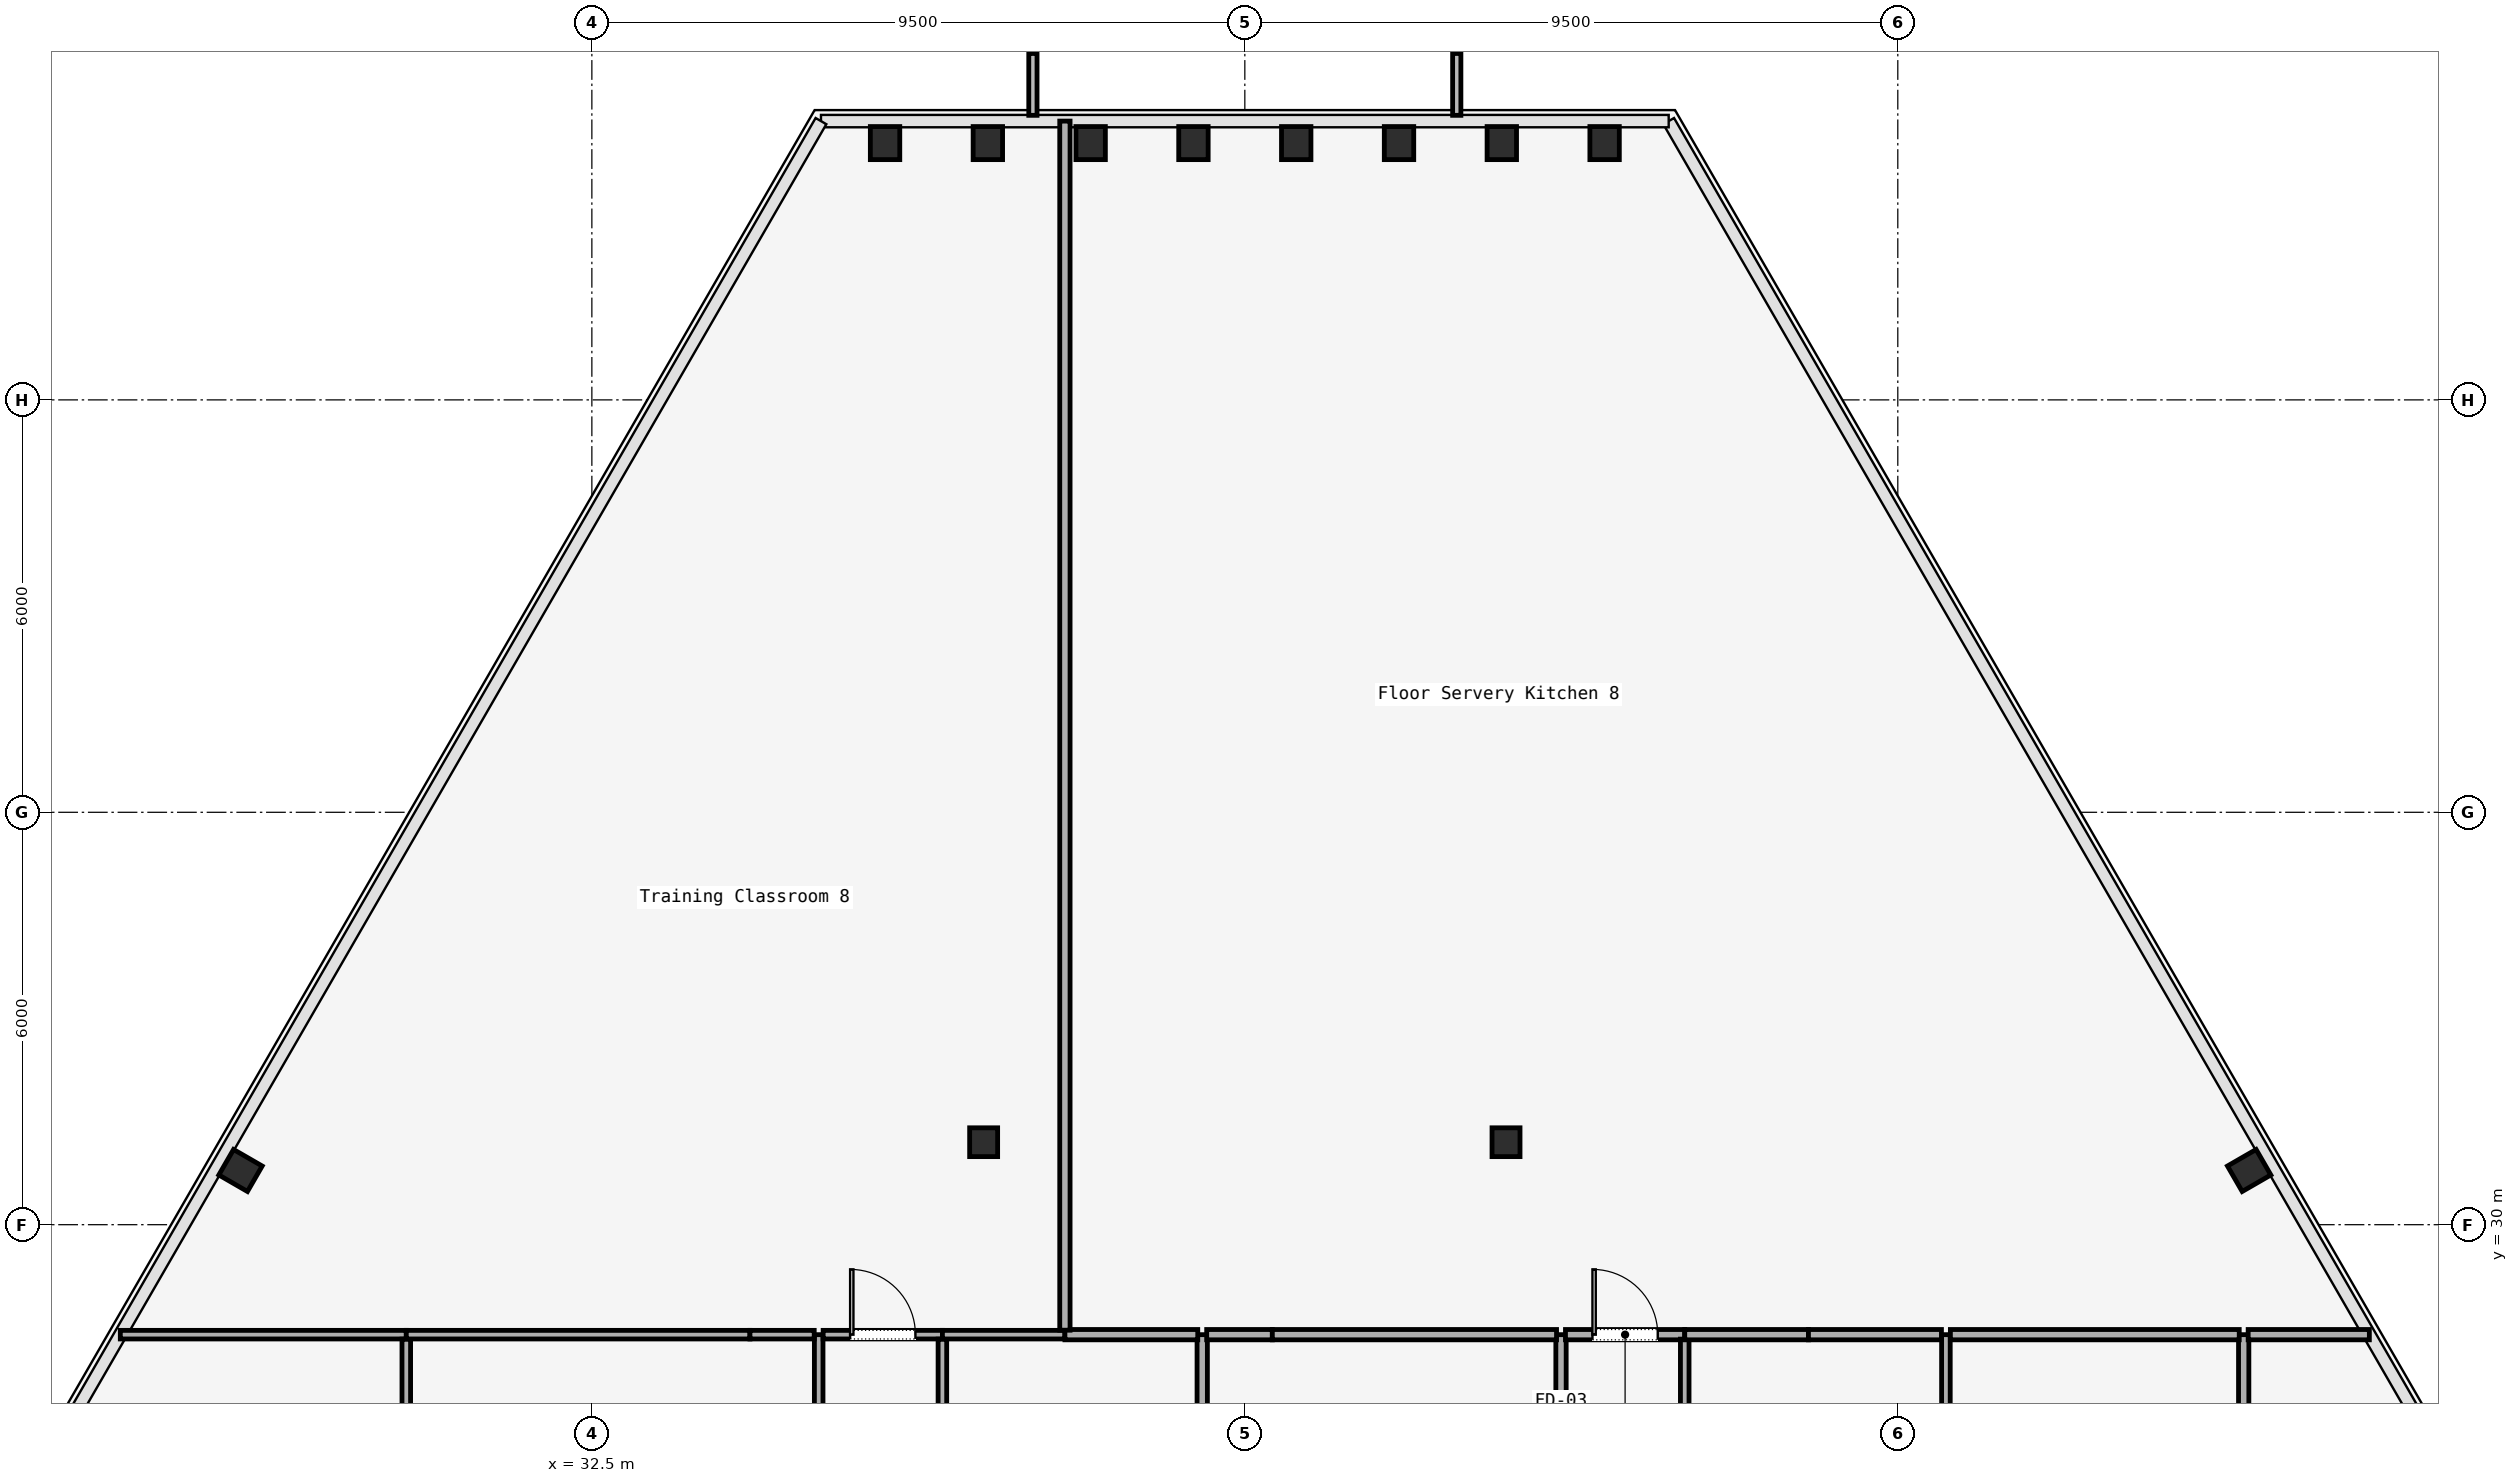
"""IFC4 building model, lengths in metres.
Left out: names, types, materials, properties, quantities, classifications, styles, units other than length and angle.
Written with IfcOpenShell. Run it as: python <this file> out.ifc"""

import sys

from ifc_helpers import new_model, si_unit, direction, frame, frame_2d, origin, origin_2d, place, context, subcontext, project, spatial, rectangle, i_section, extrude, element, fill, save


model = new_model("IFC4")
c1 = context("Model", 3, precision=1e-05, world=origin(), true_north=direction((0.0, 1.0)))
c2 = subcontext(c1, "Body", "Model", "MODEL_VIEW")
j1 = project(units=[si_unit("LENGTHUNIT", "METRE"), si_unit("PLANEANGLEUNIT", "RADIAN")], contexts=[c1])
p1 = place(None, origin())
s1 = spatial("IfcSite", under=j1, at=p1, CompositionType="ELEMENT")
p2 = place(p1, origin())
s2 = spatial("IfcBuilding", under=s1, at=p2, CompositionType="ELEMENT")
p3 = place(p2, frame((0.0, 0.0, 130.8)))
s3 = spatial("IfcBuildingStorey", under=s2, at=p3, CompositionType="ELEMENT", Elevation=130.8)
for number, where, z_axis, x_axis in (
    (1, (38.2, 31.2, 0.0), (0.0, 0.0, 1.0), (1.0, 0.0, 0.0)),
    (2, (45.8, 31.2, 0.0), (0.0, 0.0, 1.0), (1.0, 0.0, 0.0)),
):
    element("IfcColumn", number, at=place(p3, frame(where, z_axis=z_axis, x_axis=x_axis)), inside=s3, PredefinedType="COLUMN", context=c2, shape_type="SweptSolid", body=[
        extrude(i_section(OverallWidth=0.407, OverallDepth=0.419, WebThickness=0.031, FlangeThickness=0.049, FilletRadius=0.015, at=origin_2d()), origin(), (0.0, 0.0, 1.0), 3.58),
    ])
for number, where, z_axis, x_axis in (
    (3, (56.612, 30.789, 0.0), (0.0, 0.0, 1.0), (-0.5, 0.866, 0.0)),
    (4, (47.234, 45.736, 0.0), (0.0, 0.0, 1.0), (1.0, 0.0, 0.0)),
    (5, (45.739, 45.736, 0.0), (0.0, 0.0, 1.0), (1.0, 0.0, 0.0)),
    (6, (44.243, 45.736, 0.0), (0.0, 0.0, 1.0), (1.0, 0.0, 0.0)),
    (7, (42.748, 45.736, 0.0), (0.0, 0.0, 1.0), (1.0, 0.0, 0.0)),
    (8, (41.252, 45.736, 0.0), (0.0, 0.0, 1.0), (1.0, 0.0, 0.0)),
    (9, (39.757, 45.736, 0.0), (0.0, 0.0, 1.0), (1.0, 0.0, 0.0)),
    (10, (38.261, 45.736, 0.0), (0.0, 0.0, 1.0), (1.0, 0.0, 0.0)),
    (11, (36.766, 45.736, 0.0), (0.0, 0.0, 1.0), (1.0, 0.0, 0.0)),
    (12, (27.388, 30.789, 0.0), (0.0, 0.0, 1.0), (0.5, 0.866, 0.0)),
):
    element("IfcColumn", number, at=place(p3, frame(where, z_axis=z_axis, x_axis=x_axis)), inside=s3, PredefinedType="COLUMN", context=c2, shape_type="SweptSolid", body=[
        extrude(i_section(OverallWidth=0.428, OverallDepth=0.481, WebThickness=0.051, FlangeThickness=0.065, FilletRadius=0.015, at=origin_2d()), origin(), (0.0, 0.0, 1.0), 3.58),
    ])
p4 = place(p3, frame((35.8, 24.575, 0.0), z_axis=(0.0, 0.0, 1.0), x_axis=(0.0, 1.0, 0.0)))
e13 = element("IfcWall", 13, at=p4, inside=s3, PredefinedType="PARTITIONING", context=c2, shape_type="SweptSolid", body=[
    extrude(rectangle(XDim=3.825, YDim=0.125, at=frame_2d((1.912, 0.0))), origin(), (0.0, 0.0, 1.0), 3.01),
])
p5 = place(p4, frame((1.437, 0.0, 0.0)))
e14 = element("IfcOpeningElement", 14, at=p5, cuts=e13, PredefinedType="OPENING", context=c2, shape_type="SweptSolid", body=[
    extrude(rectangle(XDim=0.95, YDim=2.2, at=frame_2d((0.475, 1.1))), frame((0.0, 0.062, 0.0), z_axis=(0.0, -1.0, 0.0), x_axis=(1.0, 0.0, 0.0)), (0.0, 0.0, 1.0), 0.125),
])
p6 = place(p3, frame((35.865, 28.4, 0.0), z_axis=(0.0, 0.0, 1.0), x_axis=(1.0, 0.0, 0.0)))
e15 = element("IfcWall", 15, at=p6, inside=s3, PredefinedType="PARTITIONING", context=c2, shape_type="SweptSolid", body=[
    extrude(rectangle(XDim=1.735, YDim=0.125, at=frame_2d((0.868, 0.0))), origin(), (0.0, 0.0, 1.0), 3.01),
])
p7 = place(p6, frame((0.393, 0.0, 0.0)))
e16 = element("IfcOpeningElement", 16, at=p7, cuts=e15, PredefinedType="OPENING", context=c2, shape_type="SweptSolid", body=[
    extrude(rectangle(XDim=0.95, YDim=2.2, at=frame_2d((0.475, 1.1))), frame((0.0, 0.062, 0.0), z_axis=(0.0, -1.0, 0.0), x_axis=(1.0, 0.0, 0.0)), (0.0, 0.0, 1.0), 0.125),
])
p8 = place(p3, frame((37.6, 28.335, 0.0), z_axis=(0.0, 0.0, 1.0), x_axis=(0.0, -1.0, 0.0)))
e17 = element("IfcWall", 17, at=p8, inside=s3, PredefinedType="PARTITIONING", context=c2, shape_type="SweptSolid", body=[
    extrude(rectangle(XDim=3.77, YDim=0.125, at=frame_2d((1.885, 0.0))), origin(), (0.0, 0.0, 1.0), 3.01),
])
p9 = place(p8, frame((1.41, 0.0, 0.0)))
e18 = element("IfcOpeningElement", 18, at=p9, cuts=e17, PredefinedType="OPENING", context=c2, shape_type="SweptSolid", body=[
    extrude(rectangle(XDim=0.95, YDim=2.2, at=frame_2d((0.475, 1.1))), frame((0.0, 0.062, 0.0), z_axis=(0.0, -1.0, 0.0), x_axis=(1.0, 0.0, 0.0)), (0.0, 0.0, 1.0), 0.125),
])
p10 = place(p3, frame((46.6, 24.367, 0.0), z_axis=(0.0, 0.0, 1.0), x_axis=(0.0, 1.0, 0.0)))
e19 = element("IfcWall", 19, at=p10, inside=s3, PredefinedType="PARTITIONING", context=c2, shape_type="SweptSolid", body=[
    extrude(rectangle(XDim=4.033, YDim=0.15, at=frame_2d((2.017, 0.0))), origin(), (0.0, 0.0, 1.0), 3.01),
])
p11 = place(p10, frame((1.542, 0.0, 0.0)))
e20 = element("IfcOpeningElement", 20, at=p11, cuts=e19, PredefinedType="OPENING", context=c2, shape_type="SweptSolid", body=[
    extrude(rectangle(XDim=0.95, YDim=2.2, at=frame_2d((0.475, 1.1))), frame((0.0, 0.075, 0.0), z_axis=(0.0, -1.0, 0.0), x_axis=(1.0, 0.0, 0.0)), (0.0, 0.0, 1.0), 0.15),
])
p12 = place(p3, frame((46.665, 28.4, 0.0), z_axis=(0.0, 0.0, 1.0), x_axis=(1.0, 0.0, 0.0)))
e21 = element("IfcWall", 21, at=p12, inside=s3, PredefinedType="PARTITIONING", context=c2, shape_type="SweptSolid", body=[
    extrude(rectangle(XDim=1.735, YDim=0.15, at=frame_2d((0.867, 0.0))), origin(), (0.0, 0.0, 1.0), 3.01),
])
p13 = place(p12, frame((0.393, 0.0, 0.0)))
e22 = element("IfcOpeningElement", 22, at=p13, cuts=e21, PredefinedType="OPENING", context=c2, shape_type="SweptSolid", body=[
    extrude(rectangle(XDim=0.95, YDim=2.2, at=frame_2d((0.475, 1.1))), frame((0.0, 0.075, 0.0), z_axis=(0.0, -1.0, 0.0), x_axis=(1.0, 0.0, 0.0)), (0.0, 0.0, 1.0), 0.15),
])
p14 = place(p3, frame((48.4, 28.335, 0.0), z_axis=(0.0, 0.0, 1.0), x_axis=(0.0, -1.0, 0.0)))
e23 = element("IfcWall", 23, at=p14, inside=s3, PredefinedType="PARTITIONING", context=c2, shape_type="SweptSolid", body=[
    extrude(rectangle(XDim=6.205, YDim=0.125, at=frame_2d((3.103, 0.0))), origin(), (0.0, 0.0, 1.0), 3.01),
])
p15 = place(p14, frame((2.403, 0.0, 0.0)))
e24 = element("IfcOpeningElement", 24, at=p15, cuts=e23, PredefinedType="OPENING", context=c2, shape_type="SweptSolid", body=[
    extrude(rectangle(XDim=1.4, YDim=2.2, at=frame_2d((0.7, 1.1))), frame((0.0, 0.062, 0.0), z_axis=(0.0, -1.0, 0.0), x_axis=(1.0, 0.0, 0.0)), (0.0, 0.0, 1.0), 0.125),
])
p16 = place(p3, frame((56.532, 17.065, 0.0), z_axis=(0.0, 0.0, 1.0), x_axis=(0.0, 1.0, 0.0)))
e25 = element("IfcWall", 25, at=p16, inside=s3, PredefinedType="PARTITIONING", context=c2, shape_type="SweptSolid", body=[
    extrude(rectangle(XDim=11.335, YDim=0.15, at=frame_2d((5.667, 0.0))), origin(), (0.0, 0.0, 1.0), 3.01),
])
p17 = place(p3, frame((56.597, 28.4, 0.0), z_axis=(0.0, 0.0, 1.0), x_axis=(1.0, 0.0, 0.0)))
e26 = element("IfcWall", 26, at=p17, inside=s3, PredefinedType="PARTITIONING", context=c2, shape_type="SweptSolid", body=[
    extrude(rectangle(XDim=1.763, YDim=0.15, at=frame_2d((0.882, 0.0))), origin(), (0.0, 0.0, 1.0), 3.01),
])
p18 = place(p3, frame((25.639, 28.4, 0.0), z_axis=(0.0, 0.0, 1.0), x_axis=(1.0, 0.0, 0.0)))
e27 = element("IfcWall", 27, at=p18, inside=s3, PredefinedType="PARTITIONING", context=c2, shape_type="SweptSolid", body=[
    extrude(rectangle(XDim=4.161, YDim=0.125, at=frame_2d((2.08, 0.0))), origin(), (0.0, 0.0, 1.0), 3.01),
])
p19 = place(p3, frame((29.8, 28.335, 0.0), z_axis=(0.0, 0.0, 1.0), x_axis=(0.0, -1.0, 0.0)))
e28 = element("IfcWall", 28, at=p19, inside=s3, PredefinedType="PARTITIONING", context=c2, shape_type="SweptSolid", body=[
    extrude(rectangle(XDim=3.76, YDim=0.125, at=frame_2d((1.88, 0.0))), origin(), (0.0, 0.0, 1.0), 3.01),
])
p20 = place(p3, frame((52.2, 22.195, 0.0), z_axis=(0.0, 0.0, 1.0), x_axis=(0.0, 1.0, 0.0)))
e29 = element("IfcWall", 29, at=p20, inside=s3, PredefinedType="PARTITIONING", context=c2, shape_type="SweptSolid", body=[
    extrude(rectangle(XDim=6.205, YDim=0.125, at=frame_2d((3.103, 0.0))), origin(), (0.0, 0.0, 1.0), 3.01),
])
p21 = place(p3, frame((52.265, 28.4, 0.0), z_axis=(0.0, 0.0, 1.0), x_axis=(1.0, 0.0, 0.0)))
e30 = element("IfcWall", 30, at=p21, inside=s3, PredefinedType="PARTITIONING", context=c2, shape_type="SweptSolid", body=[
    extrude(rectangle(XDim=4.202, YDim=0.15, at=frame_2d((2.101, 0.0))), origin(), (0.0, 0.0, 1.0), 3.01),
])
p22 = place(p3, frame((48.4, 28.4, 0.0), z_axis=(0.0, 0.0, 1.0), x_axis=(1.0, 0.0, 0.0)))
e31 = element("IfcWall", 31, at=p22, inside=s3, PredefinedType="PARTITIONING", context=c2, shape_type="SweptSolid", body=[
    extrude(rectangle(XDim=1.8, YDim=0.15, at=frame_2d((0.9, 0.0))), origin(), (0.0, 0.0, 1.0), 3.01),
])
p23 = place(p3, frame((50.2, 28.4, 0.0), z_axis=(0.0, 0.0, 1.0), x_axis=(1.0, 0.0, 0.0)))
e32 = element("IfcWall", 32, at=p23, inside=s3, PredefinedType="PARTITIONING", context=c2, shape_type="SweptSolid", body=[
    extrude(rectangle(XDim=1.935, YDim=0.15, at=frame_2d((0.968, 0.0))), origin(), (0.0, 0.0, 1.0), 3.01),
])
p24 = place(p3, frame((41.38, 24.63, 0.0), z_axis=(0.0, 0.0, 1.0), x_axis=(0.0, 1.0, 0.0)))
e33 = element("IfcWall", 33, at=p24, inside=s3, PredefinedType="PARTITIONING", context=c2, shape_type="SweptSolid", body=[
    extrude(rectangle(XDim=3.77, YDim=0.15, at=frame_2d((1.885, 0.0))), origin(), (0.0, 0.0, 1.0), 3.01),
])
p25 = place(p3, frame((41.445, 28.4, 0.0), z_axis=(0.0, 0.0, 1.0), x_axis=(1.0, 0.0, 0.0)))
e34 = element("IfcWall", 34, at=p25, inside=s3, PredefinedType="PARTITIONING", context=c2, shape_type="SweptSolid", body=[
    extrude(rectangle(XDim=0.955, YDim=0.15, at=frame_2d((0.478, 0.0))), origin(), (0.0, 0.0, 1.0), 3.01),
])
p26 = place(p3, frame((42.4, 28.4, 0.0), z_axis=(0.0, 0.0, 1.0), x_axis=(1.0, 0.0, 0.0)))
e35 = element("IfcWall", 35, at=p26, inside=s3, PredefinedType="PARTITIONING", context=c2, shape_type="SweptSolid", body=[
    extrude(rectangle(XDim=4.135, YDim=0.15, at=frame_2d((2.067, 0.0))), origin(), (0.0, 0.0, 1.0), 3.01),
])
p27 = place(p3, frame((37.6, 28.4, 0.0), z_axis=(0.0, 0.0, 1.0), x_axis=(1.0, 0.0, 0.0)))
e36 = element("IfcWall", 36, at=p27, inside=s3, PredefinedType="PARTITIONING", context=c2, shape_type="SweptSolid", body=[
    extrude(rectangle(XDim=1.782, YDim=0.125, at=frame_2d((0.891, 0.0))), origin(), (0.0, 0.0, 1.0), 3.01),
])
p28 = place(p3, frame((39.382, 28.4, 0.0), z_axis=(0.0, 0.0, 1.0), x_axis=(1.0, 0.0, 0.0)))
e37 = element("IfcWall", 37, at=p28, inside=s3, PredefinedType="PARTITIONING", context=c2, shape_type="SweptSolid", body=[
    extrude(rectangle(XDim=1.933, YDim=0.15, at=frame_2d((0.966, 0.0))), origin(), (0.0, 0.0, 1.0), 3.01),
])
p29 = place(p3, frame((29.8, 28.4, 0.0), z_axis=(0.0, 0.0, 1.0), x_axis=(1.0, 0.0, 0.0)))
e38 = element("IfcWall", 38, at=p29, inside=s3, PredefinedType="PARTITIONING", context=c2, shape_type="SweptSolid", body=[
    extrude(rectangle(XDim=5.0, YDim=0.125, at=frame_2d((2.5, 0.0))), origin(), (0.0, 0.0, 1.0), 3.01),
])
p30 = place(p3, frame((34.8, 28.4, 0.0), z_axis=(0.0, 0.0, 1.0), x_axis=(1.0, 0.0, 0.0)))
e39 = element("IfcWall", 39, at=p30, inside=s3, PredefinedType="PARTITIONING", context=c2, shape_type="SweptSolid", body=[
    extrude(rectangle(XDim=0.935, YDim=0.125, at=frame_2d((0.468, 0.0))), origin(), (0.0, 0.0, 1.0), 3.01),
])
p31 = place(p3, frame((39.382, 46.056, 0.0), z_axis=(0.0, 0.0, 1.0), x_axis=(0.0, -1.0, 0.0)))
e40 = element("IfcWall", 40, at=p31, inside=s3, PredefinedType="PARTITIONING", context=c2, shape_type="SweptSolid", body=[
    extrude(rectangle(XDim=17.591, YDim=0.15, at=frame_2d((8.795, 0.0))), origin(), (0.0, 0.0, 1.0), 3.01),
])
p32 = place(p7, origin())
e41 = element("IfcDoor", 41, at=p32, inside=s3, OperationType="SINGLE_SWING_LEFT", PredefinedType="DOOR", context=c2, shape_type="SweptSolid", body=[
    extrude(rectangle(XDim=0.95, YDim=2.2, at=frame_2d((0.475, 1.1))), frame((0.0, 0.025, 0.0), z_axis=(0.0, -1.0, 0.0), x_axis=(1.0, 0.0, 0.0)), (0.0, 0.0, 1.0), 0.05),
])
fill(e16, e41)
p33 = place(p13, origin())
e42 = element("IfcDoor", 42, at=p33, inside=s3, OperationType="SINGLE_SWING_RIGHT", PredefinedType="DOOR", context=c2, shape_type="SweptSolid", body=[
    extrude(rectangle(XDim=0.95, YDim=2.2, at=frame_2d((0.475, 1.1))), frame((0.0, 0.025, 0.0), z_axis=(0.0, -1.0, 0.0), x_axis=(1.0, 0.0, 0.0)), (0.0, 0.0, 1.0), 0.05),
])
fill(e22, e42)
save(model, sys.argv[1])
